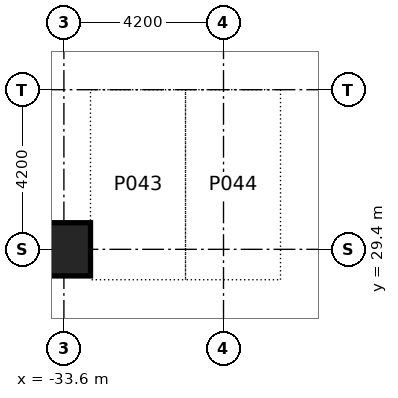
"""IFC4 building model, lengths in metres.
Left out: names, types, materials, properties, quantities, classifications, styles, units other than length and angle.
Written with IfcOpenShell. Run it as: python <this file> out.ifc"""

import sys

from ifc_helpers import new_model, si_unit, direction, frame, origin, origin_2d, place, context, subcontext, project, spatial, rectangle, extrude, element, save


model = new_model("IFC4")
c1 = context("Model", 3, precision=1e-05, world=origin(), true_north=direction((0.0, 1.0)))
c2 = subcontext(c1, "Body", "Model", "MODEL_VIEW")
j1 = project(units=[si_unit("LENGTHUNIT", "METRE"), si_unit("PLANEANGLEUNIT", "RADIAN")], contexts=[c1])
p1 = place(None, origin())
s1 = spatial("IfcSite", under=j1, at=p1, CompositionType="ELEMENT")
p2 = place(p1, origin())
s2 = spatial("IfcBuilding", under=s1, at=p2, CompositionType="ELEMENT")
p3 = place(p2, frame((0.0, 0.0, -8.4)))
s3 = spatial("IfcBuildingStorey", under=s2, at=p3, CompositionType="ELEMENT", Elevation=-8.4)
p4 = place(p3, frame((-33.6, 29.4, -0.5), z_axis=(0.0, 0.0, 1.0), x_axis=(1.0, 0.0, 0.0)))
e1 = element("IfcColumn", 1, at=p4, inside=s3, PredefinedType="COLUMN", context=c2, shape_type="SweptSolid", body=[
    extrude(rectangle(XDim=1.4, YDim=1.4, at=origin_2d()), origin(), (0.0, 0.0, 1.0), 4.7),
])
save(model, sys.argv[1])
